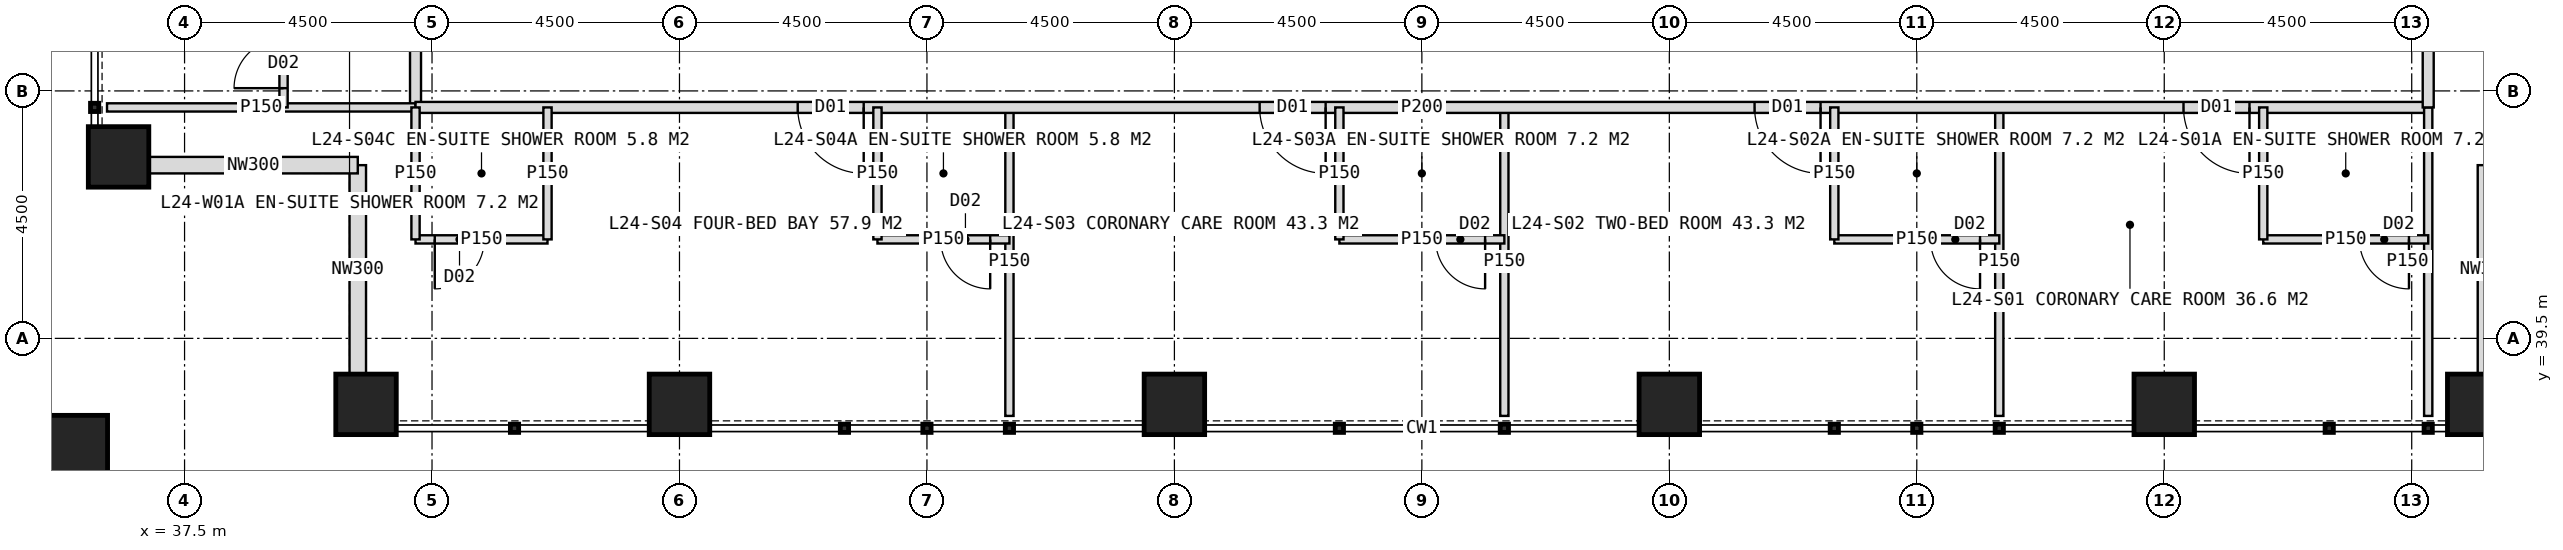
"""IFC4 building model, lengths in metres.
Left out: names, types, materials, properties, quantities, classifications, styles, units other than length and angle.
Written with IfcOpenShell. Run it as: python <this file> out.ifc"""

import sys

from ifc_helpers import new_model, si_unit, direction, frame, frame_2d, origin, origin_2d, place, context, subcontext, project, spatial, rectangle, hollow_rectangle, extrude, element, fill, save


model = new_model("IFC4")
c1 = context("Model", 3, precision=1e-05, world=origin(), true_north=direction((0.0, 1.0)))
c2 = subcontext(c1, "Body", "Model", "MODEL_VIEW")
j1 = project(units=[si_unit("LENGTHUNIT", "METRE"), si_unit("PLANEANGLEUNIT", "RADIAN")], contexts=[c1])
p1 = place(None, origin())
s1 = spatial("IfcSite", under=j1, at=p1, CompositionType="ELEMENT")
p2 = place(p1, origin())
s2 = spatial("IfcBuilding", under=s1, at=p2, CompositionType="ELEMENT")
p3 = place(p2, frame((0.0, 0.0, 104.0)))
s3 = spatial("IfcBuildingStorey", under=s2, at=p3, CompositionType="ELEMENT", Elevation=104.0)
for number, where, z_axis, x_axis in (
    (1, (40.8, 38.3, 0.0), (0.0, 0.0, 1.0), (1.0, 0.0, 0.0)),
    (2, (36.3, 42.8, 0.0), (0.0, 0.0, 1.0), (1.0, 0.0, 0.0)),
    (3, (46.5, 38.3, 0.0), (0.0, 0.0, 1.0), (1.0, 0.0, 0.0)),
    (4, (55.5, 38.3, 0.0), (0.0, 0.0, 1.0), (1.0, 0.0, 0.0)),
    (5, (64.5, 38.3, 0.0), (0.0, 0.0, 1.0), (1.0, 0.0, 0.0)),
    (6, (73.5, 38.3, 0.0), (0.0, 0.0, 1.0), (1.0, 0.0, 0.0)),
    (7, (79.2, 38.3, 0.0), (0.0, 0.0, 1.0), (1.0, 0.0, 0.0)),
):
    element("IfcColumn", number, at=place(p3, frame(where, z_axis=z_axis, x_axis=x_axis)), inside=s3, PredefinedType="COLUMN", context=c2, shape_type="SweptSolid", body=[
        extrude(hollow_rectangle(XDim=1.1, YDim=1.1, WallThickness=0.1, at=origin_2d()), origin(), (0.0, 0.0, 1.0), 4.0),
    ])
p4 = place(p3, frame((35.4, 37.4, 0.0), z_axis=(0.0, 0.0, 1.0), x_axis=(1.0, 0.0, 0.0)))
e8 = element("IfcColumn", 8, at=p4, inside=s3, PredefinedType="COLUMN", context=c2, shape_type="SweptSolid", body=[
    extrude(hollow_rectangle(XDim=1.4, YDim=1.4, WallThickness=0.08, at=origin_2d()), origin(), (0.0, 0.0, 1.0), 4.0),
])
for number, where, z_axis, x_axis in (
    (9, (40.65, 38.85, 0.0), (0.0, 0.0, 1.0), (0.0, 1.0, 0.0)),
    (10, (40.65, 42.65, 0.0), (0.0, 0.0, 1.0), (-1.0, 0.0, 0.0)),
    (11, (79.35, 42.65, 0.0), (0.0, 0.0, 1.0), (0.0, -1.0, 0.0)),
):
    element("IfcWall", number, at=place(p3, frame(where, z_axis=z_axis, x_axis=x_axis)), inside=s3, PredefinedType="ELEMENTEDWALL", context=c2, shape_type="SweptSolid", body=[
        extrude(rectangle(XDim=3.8, YDim=0.3, at=frame_2d((1.9, 0.0))), origin(), (0.0, 0.0, 1.0), 4.0),
    ])
p5 = place(p3, frame((41.7, 43.7, 0.0), z_axis=(0.0, 0.0, 1.0), x_axis=(0.0, 1.0, 0.0)))
e12 = element("IfcWall", 12, at=p5, inside=s3, PredefinedType="PARTITIONING", context=c2, shape_type="SweptSolid", body=[
    extrude(rectangle(XDim=36.6, YDim=0.2, at=frame_2d((18.3, 0.0))), origin(), (0.0, 0.0, 1.0), 3.75),
])
p6 = place(p5, frame((3.25, 0.0, 0.0)))
e13 = element("IfcOpeningElement", 13, at=p6, cuts=e12, PredefinedType="OPENING", context=c2, shape_type="SweptSolid", body=[
    extrude(rectangle(XDim=1.2, YDim=2.2, at=frame_2d((0.6, 1.1))), frame((0.0, 0.11, 0.0), z_axis=(0.0, -1.0, 0.0), x_axis=(1.0, 0.0, 0.0)), (0.0, 0.0, 1.0), 0.22),
])
p7 = place(p5, frame((11.05, 0.0, 0.0)))
e14 = element("IfcOpeningElement", 14, at=p7, cuts=e12, PredefinedType="OPENING", context=c2, shape_type="SweptSolid", body=[
    extrude(rectangle(XDim=1.2, YDim=2.2, at=frame_2d((0.6, 1.1))), frame((0.0, 0.11, 0.0), z_axis=(0.0, -1.0, 0.0), x_axis=(1.0, 0.0, 0.0)), (0.0, 0.0, 1.0), 0.22),
])
p8 = place(p5, frame((21.55, 0.0, 0.0)))
e15 = element("IfcOpeningElement", 15, at=p8, cuts=e12, PredefinedType="OPENING", context=c2, shape_type="SweptSolid", body=[
    extrude(rectangle(XDim=1.2, YDim=2.2, at=frame_2d((0.6, 1.1))), frame((0.0, 0.11, 0.0), z_axis=(0.0, -1.0, 0.0), x_axis=(1.0, 0.0, 0.0)), (0.0, 0.0, 1.0), 0.22),
])
p9 = place(p5, frame((32.05, 0.0, 0.0)))
e16 = element("IfcOpeningElement", 16, at=p9, cuts=e12, PredefinedType="OPENING", context=c2, shape_type="SweptSolid", body=[
    extrude(rectangle(XDim=1.2, YDim=2.2, at=frame_2d((0.6, 1.1))), frame((0.0, 0.11, 0.0), z_axis=(0.0, -1.0, 0.0), x_axis=(1.0, 0.0, 0.0)), (0.0, 0.0, 1.0), 0.22),
])
p10 = place(p3, frame((41.7, 43.7, 0.0), z_axis=(0.0, 0.0, 1.0), x_axis=(-1.0, 0.0, 0.0)))
e17 = element("IfcWall", 17, at=p10, inside=s3, PredefinedType="PARTITIONING", context=c2, shape_type="SweptSolid", body=[
    extrude(rectangle(XDim=5.61, YDim=0.15, at=frame_2d((2.805, 0.0))), origin(), (0.0, 0.0, 1.0), 3.75),
])
p11 = place(p3, frame((39.3, 43.7, 0.0), z_axis=(0.0, 0.0, 1.0), x_axis=(0.0, 1.0, 0.0)))
e18 = element("IfcWall", 18, at=p11, inside=s3, PredefinedType="PARTITIONING", context=c2, shape_type="SweptSolid", body=[
    extrude(rectangle(XDim=3.0, YDim=0.15, at=frame_2d((1.5, 0.0))), origin(), (0.0, 0.0, 1.0), 3.75),
])
p12 = place(p11, frame((0.35, 0.0, 0.0)))
e19 = element("IfcOpeningElement", 19, at=p12, cuts=e18, PredefinedType="OPENING", context=c2, shape_type="SweptSolid", body=[
    extrude(rectangle(XDim=0.9, YDim=2.1, at=frame_2d((0.45, 1.05))), frame((0.0, 0.085, 0.0), z_axis=(0.0, -1.0, 0.0), x_axis=(1.0, 0.0, 0.0)), (0.0, 0.0, 1.0), 0.17),
])
for number, where, z_axis, x_axis in (
    (20, (70.5, 43.7, 0.0), (0.0, 0.0, 1.0), (0.0, -1.0, 0.0)),
    (21, (61.5, 43.7, 0.0), (0.0, 0.0, 1.0), (0.0, -1.0, 0.0)),
    (22, (52.5, 43.7, 0.0), (0.0, 0.0, 1.0), (0.0, -1.0, 0.0)),
):
    element("IfcWall", number, at=place(p3, frame(where, z_axis=z_axis, x_axis=x_axis)), inside=s3, PredefinedType="PARTITIONING", context=c2, shape_type="SweptSolid", body=[
        extrude(rectangle(XDim=5.61, YDim=0.15, at=frame_2d((2.805, 0.0))), origin(), (0.0, 0.0, 1.0), 3.75),
    ])
p13 = place(p3, frame((78.3, 43.7, 0.0), z_axis=(0.0, 0.0, 1.0), x_axis=(-1.0, 0.0, 0.0)))
e23 = element("IfcWall", 23, at=p13, inside=s3, PredefinedType="PARTITIONING", context=c2, shape_type="SweptSolid", body=[
    extrude(rectangle(XDim=36.6, YDim=0.2, at=frame_2d((18.3, 0.0))), origin(), (0.0, 0.0, 1.0), 3.75),
])
p14 = place(p13, frame((3.25, 0.0, 0.0)))
e24 = element("IfcOpeningElement", 24, at=p14, cuts=e23, PredefinedType="OPENING", context=c2, shape_type="SweptSolid", body=[
    extrude(rectangle(XDim=1.2, YDim=2.2, at=frame_2d((0.6, 1.1))), frame((0.0, 0.11, 0.0), z_axis=(0.0, -1.0, 0.0), x_axis=(1.0, 0.0, 0.0)), (0.0, 0.0, 1.0), 0.22),
])
p15 = place(p13, frame((11.05, 0.0, 0.0)))
e25 = element("IfcOpeningElement", 25, at=p15, cuts=e23, PredefinedType="OPENING", context=c2, shape_type="SweptSolid", body=[
    extrude(rectangle(XDim=1.2, YDim=2.2, at=frame_2d((0.6, 1.1))), frame((0.0, 0.11, 0.0), z_axis=(0.0, -1.0, 0.0), x_axis=(1.0, 0.0, 0.0)), (0.0, 0.0, 1.0), 0.22),
])
p16 = place(p13, frame((20.05, 0.0, 0.0)))
e26 = element("IfcOpeningElement", 26, at=p16, cuts=e23, PredefinedType="OPENING", context=c2, shape_type="SweptSolid", body=[
    extrude(rectangle(XDim=1.2, YDim=2.2, at=frame_2d((0.6, 1.1))), frame((0.0, 0.11, 0.0), z_axis=(0.0, -1.0, 0.0), x_axis=(1.0, 0.0, 0.0)), (0.0, 0.0, 1.0), 0.22),
])
p17 = place(p13, frame((28.45, 0.0, 0.0)))
e27 = element("IfcOpeningElement", 27, at=p17, cuts=e23, PredefinedType="OPENING", context=c2, shape_type="SweptSolid", body=[
    extrude(rectangle(XDim=1.2, YDim=2.2, at=frame_2d((0.6, 1.1))), frame((0.0, 0.11, 0.0), z_axis=(0.0, -1.0, 0.0), x_axis=(1.0, 0.0, 0.0)), (0.0, 0.0, 1.0), 0.22),
])
p18 = place(p3, frame((78.3, 43.7, 0.0), z_axis=(0.0, 0.0, 1.0), x_axis=(0.0, -1.0, 0.0)))
e28 = element("IfcWall", 28, at=p18, inside=s3, PredefinedType="PARTITIONING", context=c2, shape_type="SweptSolid", body=[
    extrude(rectangle(XDim=5.61, YDim=0.15, at=frame_2d((2.805, 0.0))), origin(), (0.0, 0.0, 1.0), 3.75),
])
p19 = place(p3, frame((78.3, 41.3, 0.0), z_axis=(0.0, 0.0, 1.0), x_axis=(-1.0, 0.0, 0.0)))
e29 = element("IfcWall", 29, at=p19, inside=s3, PredefinedType="PARTITIONING", context=c2, shape_type="SweptSolid", body=[
    extrude(rectangle(XDim=3.0, YDim=0.15, at=frame_2d((1.5, 0.0))), origin(), (0.0, 0.0, 1.0), 3.75),
])
p20 = place(p19, frame((0.35, 0.0, 0.0)))
e30 = element("IfcOpeningElement", 30, at=p20, cuts=e29, PredefinedType="OPENING", context=c2, shape_type="SweptSolid", body=[
    extrude(rectangle(XDim=0.9, YDim=2.1, at=frame_2d((0.45, 1.05))), frame((0.0, 0.085, 0.0), z_axis=(0.0, -1.0, 0.0), x_axis=(1.0, 0.0, 0.0)), (0.0, 0.0, 1.0), 0.17),
])
p21 = place(p3, frame((75.3, 43.7, 0.0), z_axis=(0.0, 0.0, 1.0), x_axis=(0.0, -1.0, 0.0)))
e31 = element("IfcWall", 31, at=p21, inside=s3, PredefinedType="PARTITIONING", context=c2, shape_type="SweptSolid", body=[
    extrude(rectangle(XDim=2.4, YDim=0.15, at=frame_2d((1.2, 0.0))), origin(), (0.0, 0.0, 1.0), 3.75),
])
p22 = place(p3, frame((70.5, 41.3, 0.0), z_axis=(0.0, 0.0, 1.0), x_axis=(-1.0, 0.0, 0.0)))
e32 = element("IfcWall", 32, at=p22, inside=s3, PredefinedType="PARTITIONING", context=c2, shape_type="SweptSolid", body=[
    extrude(rectangle(XDim=3.0, YDim=0.15, at=frame_2d((1.5, 0.0))), origin(), (0.0, 0.0, 1.0), 3.75),
])
p23 = place(p22, frame((0.35, 0.0, 0.0)))
e33 = element("IfcOpeningElement", 33, at=p23, cuts=e32, PredefinedType="OPENING", context=c2, shape_type="SweptSolid", body=[
    extrude(rectangle(XDim=0.9, YDim=2.1, at=frame_2d((0.45, 1.05))), frame((0.0, 0.085, 0.0), z_axis=(0.0, -1.0, 0.0), x_axis=(1.0, 0.0, 0.0)), (0.0, 0.0, 1.0), 0.17),
])
p24 = place(p3, frame((67.5, 43.7, 0.0), z_axis=(0.0, 0.0, 1.0), x_axis=(0.0, -1.0, 0.0)))
e34 = element("IfcWall", 34, at=p24, inside=s3, PredefinedType="PARTITIONING", context=c2, shape_type="SweptSolid", body=[
    extrude(rectangle(XDim=2.4, YDim=0.15, at=frame_2d((1.2, 0.0))), origin(), (0.0, 0.0, 1.0), 3.75),
])
p25 = place(p3, frame((61.5, 41.3, 0.0), z_axis=(0.0, 0.0, 1.0), x_axis=(-1.0, 0.0, 0.0)))
e35 = element("IfcWall", 35, at=p25, inside=s3, PredefinedType="PARTITIONING", context=c2, shape_type="SweptSolid", body=[
    extrude(rectangle(XDim=3.0, YDim=0.15, at=frame_2d((1.5, 0.0))), origin(), (0.0, 0.0, 1.0), 3.75),
])
p26 = place(p25, frame((0.35, 0.0, 0.0)))
e36 = element("IfcOpeningElement", 36, at=p26, cuts=e35, PredefinedType="OPENING", context=c2, shape_type="SweptSolid", body=[
    extrude(rectangle(XDim=0.9, YDim=2.1, at=frame_2d((0.45, 1.05))), frame((0.0, 0.085, 0.0), z_axis=(0.0, -1.0, 0.0), x_axis=(1.0, 0.0, 0.0)), (0.0, 0.0, 1.0), 0.17),
])
p27 = place(p3, frame((58.5, 43.7, 0.0), z_axis=(0.0, 0.0, 1.0), x_axis=(0.0, -1.0, 0.0)))
e37 = element("IfcWall", 37, at=p27, inside=s3, PredefinedType="PARTITIONING", context=c2, shape_type="SweptSolid", body=[
    extrude(rectangle(XDim=2.4, YDim=0.15, at=frame_2d((1.2, 0.0))), origin(), (0.0, 0.0, 1.0), 3.75),
])
p28 = place(p3, frame((52.5, 41.3, 0.0), z_axis=(0.0, 0.0, 1.0), x_axis=(-1.0, 0.0, 0.0)))
e38 = element("IfcWall", 38, at=p28, inside=s3, PredefinedType="PARTITIONING", context=c2, shape_type="SweptSolid", body=[
    extrude(rectangle(XDim=2.4, YDim=0.15, at=frame_2d((1.2, 0.0))), origin(), (0.0, 0.0, 1.0), 3.75),
])
p29 = place(p28, frame((0.35, 0.0, 0.0)))
e39 = element("IfcOpeningElement", 39, at=p29, cuts=e38, PredefinedType="OPENING", context=c2, shape_type="SweptSolid", body=[
    extrude(rectangle(XDim=0.9, YDim=2.1, at=frame_2d((0.45, 1.05))), frame((0.0, 0.085, 0.0), z_axis=(0.0, -1.0, 0.0), x_axis=(1.0, 0.0, 0.0)), (0.0, 0.0, 1.0), 0.17),
])
p30 = place(p3, frame((50.1, 43.7, 0.0), z_axis=(0.0, 0.0, 1.0), x_axis=(0.0, -1.0, 0.0)))
e40 = element("IfcWall", 40, at=p30, inside=s3, PredefinedType="PARTITIONING", context=c2, shape_type="SweptSolid", body=[
    extrude(rectangle(XDim=2.4, YDim=0.15, at=frame_2d((1.2, 0.0))), origin(), (0.0, 0.0, 1.0), 3.75),
])
p31 = place(p3, frame((44.1, 41.3, 0.0), z_axis=(0.0, 0.0, 1.0), x_axis=(-1.0, 0.0, 0.0)))
e41 = element("IfcWall", 41, at=p31, inside=s3, PredefinedType="PARTITIONING", context=c2, shape_type="SweptSolid", body=[
    extrude(rectangle(XDim=2.4, YDim=0.15, at=frame_2d((1.2, 0.0))), origin(), (0.0, 0.0, 1.0), 3.75),
])
p32 = place(p31, frame((1.15, 0.0, 0.0)))
e42 = element("IfcOpeningElement", 42, at=p32, cuts=e41, PredefinedType="OPENING", context=c2, shape_type="SweptSolid", body=[
    extrude(rectangle(XDim=0.9, YDim=2.1, at=frame_2d((0.45, 1.05))), frame((0.0, 0.085, 0.0), z_axis=(0.0, -1.0, 0.0), x_axis=(1.0, 0.0, 0.0)), (0.0, 0.0, 1.0), 0.17),
])
for number, where, z_axis, x_axis in (
    (43, (44.1, 43.7, 0.0), (0.0, 0.0, 1.0), (0.0, -1.0, 0.0)),
    (44, (41.7, 43.7, 0.0), (0.0, 0.0, 1.0), (0.0, -1.0, 0.0)),
):
    element("IfcWall", number, at=place(p3, frame(where, z_axis=z_axis, x_axis=x_axis)), inside=s3, PredefinedType="PARTITIONING", context=c2, shape_type="SweptSolid", body=[
        extrude(rectangle(XDim=2.4, YDim=0.15, at=frame_2d((1.2, 0.0))), origin(), (0.0, 0.0, 1.0), 3.75),
    ])
p33 = place(p3, frame((78.3, 80.3, 0.0), z_axis=(0.0, 0.0, 1.0), x_axis=(0.0, -1.0, 0.0)))
e45 = element("IfcWall", 45, at=p33, inside=s3, PredefinedType="PARTITIONING", context=c2, shape_type="SweptSolid", body=[
    extrude(rectangle(XDim=36.6, YDim=0.2, at=frame_2d((18.3, 0.0))), origin(), (0.0, 0.0, 1.0), 3.75),
])
p34 = place(p33, frame((3.25, 0.0, 0.0)))
e46 = element("IfcOpeningElement", 46, at=p34, cuts=e45, PredefinedType="OPENING", context=c2, shape_type="SweptSolid", body=[
    extrude(rectangle(XDim=1.2, YDim=2.2, at=frame_2d((0.6, 1.1))), frame((0.0, 0.11, 0.0), z_axis=(0.0, -1.0, 0.0), x_axis=(1.0, 0.0, 0.0)), (0.0, 0.0, 1.0), 0.22),
])
p35 = place(p33, frame((11.05, 0.0, 0.0)))
e47 = element("IfcOpeningElement", 47, at=p35, cuts=e45, PredefinedType="OPENING", context=c2, shape_type="SweptSolid", body=[
    extrude(rectangle(XDim=1.2, YDim=2.2, at=frame_2d((0.6, 1.1))), frame((0.0, 0.11, 0.0), z_axis=(0.0, -1.0, 0.0), x_axis=(1.0, 0.0, 0.0)), (0.0, 0.0, 1.0), 0.22),
])
p36 = place(p33, frame((21.55, 0.0, 0.0)))
e48 = element("IfcOpeningElement", 48, at=p36, cuts=e45, PredefinedType="OPENING", context=c2, shape_type="SweptSolid", body=[
    extrude(rectangle(XDim=1.2, YDim=2.2, at=frame_2d((0.6, 1.1))), frame((0.0, 0.11, 0.0), z_axis=(0.0, -1.0, 0.0), x_axis=(1.0, 0.0, 0.0)), (0.0, 0.0, 1.0), 0.22),
])
p37 = place(p33, frame((32.05, 0.0, 0.0)))
e49 = element("IfcOpeningElement", 49, at=p37, cuts=e45, PredefinedType="OPENING", context=c2, shape_type="SweptSolid", body=[
    extrude(rectangle(XDim=1.2, YDim=2.2, at=frame_2d((0.6, 1.1))), frame((0.0, 0.11, 0.0), z_axis=(0.0, -1.0, 0.0), x_axis=(1.0, 0.0, 0.0)), (0.0, 0.0, 1.0), 0.22),
])
p38 = place(p12, origin())
e50 = element("IfcDoor", 50, at=p38, inside=s3, OperationType="SINGLE_SWING_LEFT", PredefinedType="DOOR", context=c2, shape_type="SweptSolid", body=[
    extrude(rectangle(XDim=0.9, YDim=2.1, at=frame_2d((0.45, 1.05))), frame((0.0, 0.025, 0.0), z_axis=(0.0, -1.0, 0.0), x_axis=(1.0, 0.0, 0.0)), (0.0, 0.0, 1.0), 0.05),
])
fill(e19, e50)
p39 = place(p14, origin())
e51 = element("IfcDoor", 51, at=p39, inside=s3, OperationType="SINGLE_SWING_LEFT", PredefinedType="DOOR", context=c2, shape_type="SweptSolid", body=[
    extrude(rectangle(XDim=1.2, YDim=2.2, at=frame_2d((0.6, 1.1))), frame((0.0, 0.025, 0.0), z_axis=(0.0, -1.0, 0.0), x_axis=(1.0, 0.0, 0.0)), (0.0, 0.0, 1.0), 0.05),
])
fill(e24, e51)
p40 = place(p20, origin())
e52 = element("IfcDoor", 52, at=p40, inside=s3, OperationType="SINGLE_SWING_LEFT", PredefinedType="DOOR", context=c2, shape_type="SweptSolid", body=[
    extrude(rectangle(XDim=0.9, YDim=2.1, at=frame_2d((0.45, 1.05))), frame((0.0, 0.025, 0.0), z_axis=(0.0, -1.0, 0.0), x_axis=(1.0, 0.0, 0.0)), (0.0, 0.0, 1.0), 0.05),
])
fill(e30, e52)
p41 = place(p15, origin())
e53 = element("IfcDoor", 53, at=p41, inside=s3, OperationType="SINGLE_SWING_LEFT", PredefinedType="DOOR", context=c2, shape_type="SweptSolid", body=[
    extrude(rectangle(XDim=1.2, YDim=2.2, at=frame_2d((0.6, 1.1))), frame((0.0, 0.025, 0.0), z_axis=(0.0, -1.0, 0.0), x_axis=(1.0, 0.0, 0.0)), (0.0, 0.0, 1.0), 0.05),
])
fill(e25, e53)
p42 = place(p23, origin())
e54 = element("IfcDoor", 54, at=p42, inside=s3, OperationType="SINGLE_SWING_LEFT", PredefinedType="DOOR", context=c2, shape_type="SweptSolid", body=[
    extrude(rectangle(XDim=0.9, YDim=2.1, at=frame_2d((0.45, 1.05))), frame((0.0, 0.025, 0.0), z_axis=(0.0, -1.0, 0.0), x_axis=(1.0, 0.0, 0.0)), (0.0, 0.0, 1.0), 0.05),
])
fill(e33, e54)
p43 = place(p16, origin())
e55 = element("IfcDoor", 55, at=p43, inside=s3, OperationType="SINGLE_SWING_LEFT", PredefinedType="DOOR", context=c2, shape_type="SweptSolid", body=[
    extrude(rectangle(XDim=1.2, YDim=2.2, at=frame_2d((0.6, 1.1))), frame((0.0, 0.025, 0.0), z_axis=(0.0, -1.0, 0.0), x_axis=(1.0, 0.0, 0.0)), (0.0, 0.0, 1.0), 0.05),
])
fill(e26, e55)
p44 = place(p26, origin())
e56 = element("IfcDoor", 56, at=p44, inside=s3, OperationType="SINGLE_SWING_LEFT", PredefinedType="DOOR", context=c2, shape_type="SweptSolid", body=[
    extrude(rectangle(XDim=0.9, YDim=2.1, at=frame_2d((0.45, 1.05))), frame((0.0, 0.025, 0.0), z_axis=(0.0, -1.0, 0.0), x_axis=(1.0, 0.0, 0.0)), (0.0, 0.0, 1.0), 0.05),
])
fill(e36, e56)
p45 = place(p17, origin())
e57 = element("IfcDoor", 57, at=p45, inside=s3, OperationType="SINGLE_SWING_LEFT", PredefinedType="DOOR", context=c2, shape_type="SweptSolid", body=[
    extrude(rectangle(XDim=1.2, YDim=2.2, at=frame_2d((0.6, 1.1))), frame((0.0, 0.025, 0.0), z_axis=(0.0, -1.0, 0.0), x_axis=(1.0, 0.0, 0.0)), (0.0, 0.0, 1.0), 0.05),
])
fill(e27, e57)
p46 = place(p29, origin())
e58 = element("IfcDoor", 58, at=p46, inside=s3, OperationType="SINGLE_SWING_LEFT", PredefinedType="DOOR", context=c2, shape_type="SweptSolid", body=[
    extrude(rectangle(XDim=0.9, YDim=2.1, at=frame_2d((0.45, 1.05))), frame((0.0, 0.025, 0.0), z_axis=(0.0, -1.0, 0.0), x_axis=(1.0, 0.0, 0.0)), (0.0, 0.0, 1.0), 0.05),
])
fill(e39, e58)
p47 = place(p32, origin())
e59 = element("IfcDoor", 59, at=p47, inside=s3, OperationType="SINGLE_SWING_RIGHT", PredefinedType="DOOR", context=c2, shape_type="SweptSolid", body=[
    extrude(rectangle(XDim=0.9, YDim=2.1, at=frame_2d((0.45, 1.05))), frame((0.0, 0.025, 0.0), z_axis=(0.0, -1.0, 0.0), x_axis=(1.0, 0.0, 0.0)), (0.0, 0.0, 1.0), 0.05),
])
fill(e42, e59)
save(model, sys.argv[1])
